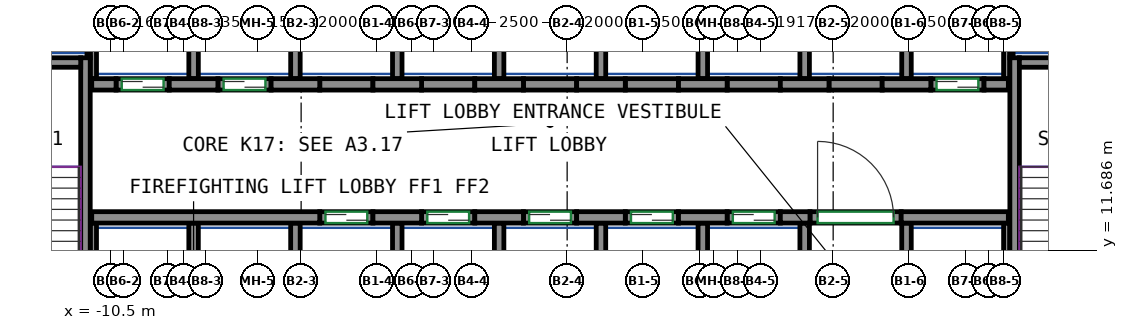
"""IFC4 building model, lengths in metres.
Left out: names, types, materials, properties, quantities, classifications, styles, units other than length and angle.
Written with IfcOpenShell. Run it as: python <this file> out.ifc"""

import sys

from ifc_helpers import new_model, si_unit, direction, frame, frame_2d, origin, place, context, subcontext, project, spatial, rectangle, extrude, source, transform, mapped, element, fill, save


model = new_model("IFC4")
c1 = context("Model", 3, precision=1e-05, world=origin(), true_north=direction((0.0, 1.0)))
c2 = subcontext(c1, "Body", "Model", "MODEL_VIEW")
j1 = project(units=[si_unit("LENGTHUNIT", "METRE"), si_unit("PLANEANGLEUNIT", "RADIAN")], contexts=[c1])
p1 = place(None, origin())
s1 = spatial("IfcSite", under=j1, at=p1, CompositionType="ELEMENT")
p2 = place(p1, origin())
s2 = spatial("IfcBuilding", under=s1, at=p2, CompositionType="ELEMENT")
p3 = place(p2, frame((0.0, 0.0, 71.2)))
s3 = spatial("IfcBuildingStorey", under=s2, at=p3, CompositionType="ELEMENT", Elevation=71.2)
m1 = source(origin(), c2, "Body", "SweptSolid", [
    extrude(rectangle(XDim=7.75, YDim=0.25, at=frame_2d((3.875, 0.0))), origin(), (0.0, 0.0, 1.0), 3.72),
])
p4 = place(p3, frame((-11.175, 9.0, 0.0), z_axis=(0.0, 0.0, 1.0), x_axis=(0.0, 1.0, 0.0)))
e1 = element("IfcWall", 1, at=p4, inside=s3, PredefinedType="SHEAR", context=c2, shape_type="MappedRepresentation", body=[
    mapped(m1, transform((0.0, 0.0, 0.0))),
])
m2 = source(origin(), c2, "Body", "SweptSolid", [
    extrude(rectangle(XDim=3.7, YDim=0.25, at=frame_2d((1.85, 0.0))), origin(), (0.0, 0.0, 1.0), 3.72),
])
p5 = place(p3, frame((-15.0, 16.625, 0.0), z_axis=(0.0, 0.0, 1.0), x_axis=(1.0, 0.0, 0.0)))
e2 = element("IfcWall", 2, at=p5, inside=s3, PredefinedType="SHEAR", context=c2, shape_type="MappedRepresentation", body=[
    mapped(m2, transform((0.0, 0.0, 0.0))),
])
p6 = place(p3, frame((13.275, 9.0, 0.0), z_axis=(0.0, 0.0, 1.0), x_axis=(0.0, 1.0, 0.0)))
e3 = element("IfcWall", 3, at=p6, inside=s3, PredefinedType="SHEAR", context=c2, shape_type="MappedRepresentation", body=[
    mapped(m1, transform((0.0, 0.0, 0.0))),
])
m3 = source(origin(), c2, "Body", "SweptSolid", [
    extrude(rectangle(XDim=3.7, YDim=0.25, at=frame_2d((1.85, 0.0))), origin(), (0.0, 0.0, 1.0), 3.72),
])
p7 = place(p3, frame((13.4, 16.625, 0.0), z_axis=(0.0, 0.0, 1.0), x_axis=(1.0, 0.0, 0.0)))
e4 = element("IfcWall", 4, at=p7, inside=s3, PredefinedType="SHEAR", context=c2, shape_type="MappedRepresentation", body=[
    mapped(m3, transform((0.0, 0.0, 0.0))),
])
m4 = source(origin(), c2, "Body", "SweptSolid", [
    extrude(rectangle(XDim=6.0, YDim=0.3, at=frame_2d((3.0, 0.0))), origin(), (0.0, 0.0, 1.0), 3.72),
])
p8 = place(p3, frame((-11.01, 12.55, 0.0), z_axis=(0.0, 0.0, 1.0), x_axis=(1.0, 0.0, 0.0)))
e5 = element("IfcWall", 5, at=p8, inside=s3, PredefinedType="SHEAR", context=c2, shape_type="MappedRepresentation", body=[
    mapped(m4, transform((0.0, 0.0, 0.0))),
])
m5 = source(origin(), c2, "Body", "SweptSolid", [
    extrude(rectangle(XDim=1.28, YDim=0.3, at=frame_2d((0.64, 0.0))), origin(), (0.0, 0.0, 1.0), 3.72),
])
for number, where, z_axis, x_axis in (
    (6, (-3.61, 12.55, 0.0), (0.0, 0.0, 1.0), (1.0, 0.0, 0.0)),
    (7, (-0.93, 12.55, 0.0), (0.0, 0.0, 1.0), (1.0, 0.0, 0.0)),
    (8, (1.75, 12.55, 0.0), (0.0, 0.0, 1.0), (1.0, 0.0, 0.0)),
    (9, (4.43, 12.55, 0.0), (0.0, 0.0, 1.0), (1.0, 0.0, 0.0)),
):
    element("IfcWall", number, at=place(p3, frame(where, z_axis=z_axis, x_axis=x_axis)), inside=s3, PredefinedType="SHEAR", context=c2, shape_type="MappedRepresentation", body=[
        mapped(m5, transform((0.0, 0.0, 0.0))),
    ])
m6 = source(origin(), c2, "Body", "SweptSolid", [
    extrude(rectangle(XDim=0.78, YDim=0.3, at=frame_2d((0.39, 0.0))), origin(), (0.0, 0.0, 1.0), 3.72),
])
p9 = place(p3, frame((7.11, 12.55, 0.0), z_axis=(0.0, 0.0, 1.0), x_axis=(1.0, 0.0, 0.0)))
e10 = element("IfcWall", 10, at=p9, inside=s3, PredefinedType="SHEAR", context=c2, shape_type="MappedRepresentation", body=[
    mapped(m6, transform((0.0, 0.0, 0.0))),
])
m7 = source(origin(), c2, "Body", "SweptSolid", [
    extrude(rectangle(XDim=2.82, YDim=0.3, at=frame_2d((1.41, 0.0))), origin(), (0.0, 0.0, 1.0), 3.72),
])
p10 = place(p3, frame((10.29, 12.55, 0.0), z_axis=(0.0, 0.0, 1.0), x_axis=(1.0, 0.0, 0.0)))
e11 = element("IfcWall", 11, at=p10, inside=s3, PredefinedType="SHEAR", context=c2, shape_type="MappedRepresentation", body=[
    mapped(m7, transform((0.0, 0.0, 0.0))),
])
m8 = source(origin(), c2, "Body", "SweptSolid", [
    extrude(rectangle(XDim=0.64, YDim=0.3, at=frame_2d((0.32, 0.0))), origin(), (0.0, 0.0, 1.0), 3.72),
])
p11 = place(p3, frame((-11.01, 16.05, 0.0), z_axis=(0.0, 0.0, 1.0), x_axis=(1.0, 0.0, 0.0)))
e12 = element("IfcWall", 12, at=p11, inside=s3, PredefinedType="SHEAR", context=c2, shape_type="MappedRepresentation", body=[
    mapped(m8, transform((0.0, 0.0, 0.0))),
])
for number, where, z_axis, x_axis in (
    (13, (-8.97, 16.05, 0.0), (0.0, 0.0, 1.0), (1.0, 0.0, 0.0)),
    (14, (-6.29, 16.05, 0.0), (0.0, 0.0, 1.0), (1.0, 0.0, 0.0)),
    (15, (-3.61, 16.05, 0.0), (0.0, 0.0, 1.0), (1.0, 0.0, 0.0)),
    (16, (-0.93, 16.05, 0.0), (0.0, 0.0, 1.0), (1.0, 0.0, 0.0)),
    (17, (1.75, 16.05, 0.0), (0.0, 0.0, 1.0), (1.0, 0.0, 0.0)),
    (18, (4.43, 16.05, 0.0), (0.0, 0.0, 1.0), (1.0, 0.0, 0.0)),
):
    element("IfcWall", number, at=place(p3, frame(where, z_axis=z_axis, x_axis=x_axis)), inside=s3, PredefinedType="SHEAR", context=c2, shape_type="MappedRepresentation", body=[
        mapped(m5, transform((0.0, 0.0, 0.0))),
    ])
m9 = source(origin(), c2, "Body", "SweptSolid", [
    extrude(rectangle(XDim=1.28, YDim=0.3, at=frame_2d((0.64, 0.0))), origin(), (0.0, 0.0, 1.0), 3.72),
])
p12 = place(p3, frame((7.11, 16.05, 0.0), z_axis=(0.0, 0.0, 1.0), x_axis=(1.0, 0.0, 0.0)))
e19 = element("IfcWall", 19, at=p12, inside=s3, PredefinedType="SHEAR", context=c2, shape_type="MappedRepresentation", body=[
    mapped(m9, transform((0.0, 0.0, 0.0))),
])
p13 = place(p3, frame((9.79, 16.05, 0.0), z_axis=(0.0, 0.0, 1.0), x_axis=(1.0, 0.0, 0.0)))
e20 = element("IfcWall", 20, at=p13, inside=s3, PredefinedType="SHEAR", context=c2, shape_type="MappedRepresentation", body=[
    mapped(m5, transform((0.0, 0.0, 0.0))),
])
m10 = source(origin(), c2, "Body", "SweptSolid", [
    extrude(rectangle(XDim=0.64, YDim=0.3, at=frame_2d((0.32, 0.0))), origin(), (0.0, 0.0, 1.0), 3.72),
])
p14 = place(p3, frame((12.47, 16.05, 0.0), z_axis=(0.0, 0.0, 1.0), x_axis=(1.0, 0.0, 0.0)))
e21 = element("IfcWall", 21, at=p14, inside=s3, PredefinedType="SHEAR", context=c2, shape_type="MappedRepresentation", body=[
    mapped(m10, transform((0.0, 0.0, 0.0))),
])
m11 = source(origin(), c2, "Body", "SweptSolid", [
    extrude(rectangle(XDim=1.4, YDim=0.3, at=frame_2d((0.7, 0.0))), origin(), (0.0, 0.0, 1.0), 3.72),
])
p15 = place(p3, frame((-5.01, 12.55, 0.0), z_axis=(0.0, 0.0, 1.0), x_axis=(1.0, 0.0, 0.0)))
e22 = element("IfcWall", 22, at=p15, inside=s3, PredefinedType="PARTITIONING", context=c2, shape_type="MappedRepresentation", body=[
    mapped(m11, transform((0.0, 0.0, 0.0))),
])
p16 = place(p15, frame((0.15, 0.0, 0.0)))
e23 = element("IfcOpeningElement", 23, at=p16, cuts=e22, PredefinedType="OPENING", context=c2, shape_type="SweptSolid", body=[
    extrude(rectangle(XDim=1.1, YDim=2.1, at=frame_2d((0.55, 1.05))), frame((0.0, 0.16, 0.0), z_axis=(0.0, -1.0, 0.0), x_axis=(1.0, 0.0, 0.0)), (0.0, 0.0, 1.0), 0.32),
])
m12 = source(origin(), c2, "Body", "SweptSolid", [
    extrude(rectangle(XDim=1.4, YDim=0.3, at=frame_2d((0.7, 0.0))), origin(), (0.0, 0.0, 1.0), 3.72),
])
p17 = place(p3, frame((-2.33, 12.55, 0.0), z_axis=(0.0, 0.0, 1.0), x_axis=(1.0, 0.0, 0.0)))
e24 = element("IfcWall", 24, at=p17, inside=s3, PredefinedType="PARTITIONING", context=c2, shape_type="MappedRepresentation", body=[
    mapped(m12, transform((0.0, 0.0, 0.0))),
])
p18 = place(p17, frame((0.15, 0.0, 0.0)))
e25 = element("IfcOpeningElement", 25, at=p18, cuts=e24, PredefinedType="OPENING", context=c2, shape_type="SweptSolid", body=[
    extrude(rectangle(XDim=1.1, YDim=2.1, at=frame_2d((0.55, 1.05))), frame((0.0, 0.16, 0.0), z_axis=(0.0, -1.0, 0.0), x_axis=(1.0, 0.0, 0.0)), (0.0, 0.0, 1.0), 0.32),
])
p19 = place(p3, frame((0.35, 12.55, 0.0), z_axis=(0.0, 0.0, 1.0), x_axis=(1.0, 0.0, 0.0)))
e26 = element("IfcWall", 26, at=p19, inside=s3, PredefinedType="PARTITIONING", context=c2, shape_type="MappedRepresentation", body=[
    mapped(m11, transform((0.0, 0.0, 0.0))),
])
p20 = place(p19, frame((0.15, 0.0, 0.0)))
e27 = element("IfcOpeningElement", 27, at=p20, cuts=e26, PredefinedType="OPENING", context=c2, shape_type="SweptSolid", body=[
    extrude(rectangle(XDim=1.1, YDim=2.1, at=frame_2d((0.55, 1.05))), frame((0.0, 0.16, 0.0), z_axis=(0.0, -1.0, 0.0), x_axis=(1.0, 0.0, 0.0)), (0.0, 0.0, 1.0), 0.32),
])
p21 = place(p3, frame((3.03, 12.55, 0.0), z_axis=(0.0, 0.0, 1.0), x_axis=(1.0, 0.0, 0.0)))
e28 = element("IfcWall", 28, at=p21, inside=s3, PredefinedType="PARTITIONING", context=c2, shape_type="MappedRepresentation", body=[
    mapped(m11, transform((0.0, 0.0, 0.0))),
])
p22 = place(p21, frame((0.15, 0.0, 0.0)))
e29 = element("IfcOpeningElement", 29, at=p22, cuts=e28, PredefinedType="OPENING", context=c2, shape_type="SweptSolid", body=[
    extrude(rectangle(XDim=1.1, YDim=2.1, at=frame_2d((0.55, 1.05))), frame((0.0, 0.16, 0.0), z_axis=(0.0, -1.0, 0.0), x_axis=(1.0, 0.0, 0.0)), (0.0, 0.0, 1.0), 0.32),
])
p23 = place(p3, frame((5.71, 12.55, 0.0), z_axis=(0.0, 0.0, 1.0), x_axis=(1.0, 0.0, 0.0)))
e30 = element("IfcWall", 30, at=p23, inside=s3, PredefinedType="PARTITIONING", context=c2, shape_type="MappedRepresentation", body=[
    mapped(m12, transform((0.0, 0.0, 0.0))),
])
p24 = place(p23, frame((0.15, 0.0, 0.0)))
e31 = element("IfcOpeningElement", 31, at=p24, cuts=e30, PredefinedType="OPENING", context=c2, shape_type="SweptSolid", body=[
    extrude(rectangle(XDim=1.1, YDim=2.1, at=frame_2d((0.55, 1.05))), frame((0.0, 0.16, 0.0), z_axis=(0.0, -1.0, 0.0), x_axis=(1.0, 0.0, 0.0)), (0.0, 0.0, 1.0), 0.32),
])
p25 = place(p3, frame((11.07, 16.05, 0.0), z_axis=(0.0, 0.0, 1.0), x_axis=(1.0, 0.0, 0.0)))
e32 = element("IfcWall", 32, at=p25, inside=s3, PredefinedType="PARTITIONING", context=c2, shape_type="MappedRepresentation", body=[
    mapped(m11, transform((0.0, 0.0, 0.0))),
])
p26 = place(p25, frame((0.15, 0.0, 0.0)))
e33 = element("IfcOpeningElement", 33, at=p26, cuts=e32, PredefinedType="OPENING", context=c2, shape_type="SweptSolid", body=[
    extrude(rectangle(XDim=1.1, YDim=2.1, at=frame_2d((0.55, 1.05))), frame((0.0, 0.16, 0.0), z_axis=(0.0, -1.0, 0.0), x_axis=(1.0, 0.0, 0.0)), (0.0, 0.0, 1.0), 0.32),
])
p27 = place(p3, frame((-10.37, 16.05, 0.0), z_axis=(0.0, 0.0, 1.0), x_axis=(1.0, 0.0, 0.0)))
e34 = element("IfcWall", 34, at=p27, inside=s3, PredefinedType="PARTITIONING", context=c2, shape_type="MappedRepresentation", body=[
    mapped(m12, transform((0.0, 0.0, 0.0))),
])
p28 = place(p27, frame((0.15, 0.0, 0.0)))
e35 = element("IfcOpeningElement", 35, at=p28, cuts=e34, PredefinedType="OPENING", context=c2, shape_type="SweptSolid", body=[
    extrude(rectangle(XDim=1.1, YDim=2.1, at=frame_2d((0.55, 1.05))), frame((0.0, 0.16, 0.0), z_axis=(0.0, -1.0, 0.0), x_axis=(1.0, 0.0, 0.0)), (0.0, 0.0, 1.0), 0.32),
])
p29 = place(p3, frame((-7.69, 16.05, 0.0), z_axis=(0.0, 0.0, 1.0), x_axis=(1.0, 0.0, 0.0)))
e36 = element("IfcWall", 36, at=p29, inside=s3, PredefinedType="PARTITIONING", context=c2, shape_type="MappedRepresentation", body=[
    mapped(m11, transform((0.0, 0.0, 0.0))),
])
p30 = place(p29, frame((0.15, 0.0, 0.0)))
e37 = element("IfcOpeningElement", 37, at=p30, cuts=e36, PredefinedType="OPENING", context=c2, shape_type="SweptSolid", body=[
    extrude(rectangle(XDim=1.1, YDim=2.1, at=frame_2d((0.55, 1.05))), frame((0.0, 0.16, 0.0), z_axis=(0.0, -1.0, 0.0), x_axis=(1.0, 0.0, 0.0)), (0.0, 0.0, 1.0), 0.32),
])
m13 = source(origin(), c2, "Body", "SweptSolid", [
    extrude(rectangle(XDim=2.4, YDim=0.3, at=frame_2d((1.2, 0.0))), origin(), (0.0, 0.0, 1.0), 3.72),
])
p31 = place(p3, frame((7.89, 12.55, 0.0), z_axis=(0.0, 0.0, 1.0), x_axis=(1.0, 0.0, 0.0)))
e38 = element("IfcWall", 38, at=p31, inside=s3, PredefinedType="PARTITIONING", context=c2, shape_type="MappedRepresentation", body=[
    mapped(m13, transform((0.0, 0.0, 0.0))),
])
p32 = place(p31, frame((0.2, 0.0, 0.0)))
e39 = element("IfcOpeningElement", 39, at=p32, cuts=e38, PredefinedType="OPENING", context=c2, shape_type="SweptSolid", body=[
    extrude(rectangle(XDim=2.0, YDim=2.1, at=frame_2d((1.0, 1.05))), frame((0.0, 0.16, 0.0), z_axis=(0.0, -1.0, 0.0), x_axis=(1.0, 0.0, 0.0)), (0.0, 0.0, 1.0), 0.32),
])
p33 = place(p3, frame((-5.01, 16.05, 0.0), z_axis=(0.0, 0.0, 1.0), x_axis=(1.0, 0.0, 0.0)))
e40 = element("IfcWall", 40, at=p33, inside=s3, PredefinedType="PARTITIONING", context=c2, shape_type="MappedRepresentation", body=[
    mapped(m11, transform((0.0, 0.0, 0.0))),
])
p34 = place(p3, frame((-2.33, 16.05, 0.0), z_axis=(0.0, 0.0, 1.0), x_axis=(1.0, 0.0, 0.0)))
e41 = element("IfcWall", 41, at=p34, inside=s3, PredefinedType="PARTITIONING", context=c2, shape_type="MappedRepresentation", body=[
    mapped(m12, transform((0.0, 0.0, 0.0))),
])
for number, where, z_axis, x_axis in (
    (42, (0.35, 16.05, 0.0), (0.0, 0.0, 1.0), (1.0, 0.0, 0.0)),
    (43, (3.03, 16.05, 0.0), (0.0, 0.0, 1.0), (1.0, 0.0, 0.0)),
):
    element("IfcWall", number, at=place(p3, frame(where, z_axis=z_axis, x_axis=x_axis)), inside=s3, PredefinedType="PARTITIONING", context=c2, shape_type="MappedRepresentation", body=[
        mapped(m11, transform((0.0, 0.0, 0.0))),
    ])
for number, where, z_axis, x_axis in (
    (44, (5.71, 16.05, 0.0), (0.0, 0.0, 1.0), (1.0, 0.0, 0.0)),
    (45, (8.39, 16.05, 0.0), (0.0, 0.0, 1.0), (1.0, 0.0, 0.0)),
):
    element("IfcWall", number, at=place(p3, frame(where, z_axis=z_axis, x_axis=x_axis)), inside=s3, PredefinedType="PARTITIONING", context=c2, shape_type="MappedRepresentation", body=[
        mapped(m12, transform((0.0, 0.0, 0.0))),
    ])
m14 = source(origin(), c2, "Body", "SweptSolid", [
    extrude(rectangle(XDim=3.275, YDim=0.165, at=frame_2d((1.638, 0.0))), origin(), (0.0, 0.0, 1.0), 3.72),
])
for number, where, z_axis, x_axis in (
    (46, (13.067, 16.2, 0.0), (0.0, 0.0, 1.0), (0.0, 1.0, 0.0)),
    (47, (-10.968, 16.2, 0.0), (0.0, 0.0, 1.0), (0.0, 1.0, 0.0)),
):
    element("IfcWall", number, at=place(p3, frame(where, z_axis=z_axis, x_axis=x_axis)), inside=s3, PredefinedType="PARTITIONING", context=c2, shape_type="MappedRepresentation", body=[
        mapped(m14, transform((0.0, 0.0, 0.0))),
    ])
m15 = source(origin(), c2, "Body", "SweptSolid", [
    extrude(rectangle(XDim=3.275, YDim=0.25, at=frame_2d((1.638, 0.0))), origin(), (0.0, 0.0, 1.0), 3.72),
])
p35 = place(p3, frame((10.43, 16.2, 0.0), z_axis=(0.0, 0.0, 1.0), x_axis=(0.0, 1.0, 0.0)))
e48 = element("IfcWall", 48, at=p35, inside=s3, PredefinedType="PARTITIONING", context=c2, shape_type="MappedRepresentation", body=[
    mapped(m15, transform((0.0, 0.0, 0.0))),
])
m16 = source(origin(), c2, "Body", "SweptSolid", [
    extrude(rectangle(XDim=2.725, YDim=0.085, at=frame_2d((1.363, 0.0))), origin(), (0.0, 0.0, 1.0), 3.72),
])
p36 = place(p3, frame((13.192, 16.75, 0.0), z_axis=(0.0, 0.0, 1.0), x_axis=(0.0, 1.0, 0.0)))
e49 = element("IfcWall", 49, at=p36, inside=s3, PredefinedType="PARTITIONING", context=c2, shape_type="MappedRepresentation", body=[
    mapped(m16, transform((0.0, 0.0, 0.0))),
])
for number, where, z_axis, x_axis in (
    (50, (2.39, 16.2, 0.0), (0.0, 0.0, 1.0), (0.0, 1.0, 0.0)),
    (51, (5.07, 16.2, 0.0), (0.0, 0.0, 1.0), (0.0, 1.0, 0.0)),
    (52, (7.75, 16.2, 0.0), (0.0, 0.0, 1.0), (0.0, 1.0, 0.0)),
    (53, (-0.29, 16.2, 0.0), (0.0, 0.0, 1.0), (0.0, 1.0, 0.0)),
):
    element("IfcWall", number, at=place(p3, frame(where, z_axis=z_axis, x_axis=x_axis)), inside=s3, PredefinedType="PARTITIONING", context=c2, shape_type="MappedRepresentation", body=[
        mapped(m15, transform((0.0, 0.0, 0.0))),
    ])
p37 = place(p3, frame((-11.093, 16.75, 0.0), z_axis=(0.0, 0.0, 1.0), x_axis=(0.0, 1.0, 0.0)))
e54 = element("IfcWall", 54, at=p37, inside=s3, PredefinedType="PARTITIONING", context=c2, shape_type="MappedRepresentation", body=[
    mapped(m16, transform((0.0, 0.0, 0.0))),
])
for number, where, z_axis, x_axis in (
    (55, (-2.97, 16.2, 0.0), (0.0, 0.0, 1.0), (0.0, 1.0, 0.0)),
    (56, (-5.65, 16.2, 0.0), (0.0, 0.0, 1.0), (0.0, 1.0, 0.0)),
    (57, (-8.33, 16.2, 0.0), (0.0, 0.0, 1.0), (0.0, 1.0, 0.0)),
):
    element("IfcWall", number, at=place(p3, frame(where, z_axis=z_axis, x_axis=x_axis)), inside=s3, PredefinedType="PARTITIONING", context=c2, shape_type="MappedRepresentation", body=[
        mapped(m15, transform((0.0, 0.0, 0.0))),
    ])
m17 = source(origin(), c2, "Body", "SweptSolid", [
    extrude(rectangle(XDim=3.4, YDim=0.25, at=frame_2d((1.7, 0.0))), origin(), (0.0, 0.0, 1.0), 3.72),
])
p38 = place(p3, frame((10.43, 9.0, 0.0), z_axis=(0.0, 0.0, 1.0), x_axis=(0.0, 1.0, 0.0)))
e58 = element("IfcWall", 58, at=p38, inside=s3, PredefinedType="PARTITIONING", context=c2, shape_type="MappedRepresentation", body=[
    mapped(m17, transform((0.0, 0.0, 0.0))),
])
m18 = source(origin(), c2, "Body", "SweptSolid", [
    extrude(rectangle(XDim=3.4, YDim=0.165, at=frame_2d((1.7, 0.0))), origin(), (0.0, 0.0, 1.0), 3.72),
])
p39 = place(p3, frame((13.067, 9.0, 0.0), z_axis=(0.0, 0.0, 1.0), x_axis=(0.0, 1.0, 0.0)))
e59 = element("IfcWall", 59, at=p39, inside=s3, PredefinedType="PARTITIONING", context=c2, shape_type="MappedRepresentation", body=[
    mapped(m18, transform((0.0, 0.0, 0.0))),
])
for number, where, z_axis, x_axis in (
    (60, (2.39, 9.0, 0.0), (0.0, 0.0, 1.0), (0.0, 1.0, 0.0)),
    (61, (5.07, 9.0, 0.0), (0.0, 0.0, 1.0), (0.0, 1.0, 0.0)),
    (62, (7.75, 9.0, 0.0), (0.0, 0.0, 1.0), (0.0, 1.0, 0.0)),
    (63, (-0.29, 9.0, 0.0), (0.0, 0.0, 1.0), (0.0, 1.0, 0.0)),
):
    element("IfcWall", number, at=place(p3, frame(where, z_axis=z_axis, x_axis=x_axis)), inside=s3, PredefinedType="PARTITIONING", context=c2, shape_type="MappedRepresentation", body=[
        mapped(m17, transform((0.0, 0.0, 0.0))),
    ])
p40 = place(p3, frame((-10.968, 9.0, 0.0), z_axis=(0.0, 0.0, 1.0), x_axis=(0.0, 1.0, 0.0)))
e64 = element("IfcWall", 64, at=p40, inside=s3, PredefinedType="PARTITIONING", context=c2, shape_type="MappedRepresentation", body=[
    mapped(m18, transform((0.0, 0.0, 0.0))),
])
for number, where, z_axis, x_axis in (
    (65, (-2.97, 9.0, 0.0), (0.0, 0.0, 1.0), (0.0, 1.0, 0.0)),
    (66, (-5.65, 9.0, 0.0), (0.0, 0.0, 1.0), (0.0, 1.0, 0.0)),
    (67, (-8.33, 9.0, 0.0), (0.0, 0.0, 1.0), (0.0, 1.0, 0.0)),
):
    element("IfcWall", number, at=place(p3, frame(where, z_axis=z_axis, x_axis=x_axis)), inside=s3, PredefinedType="PARTITIONING", context=c2, shape_type="MappedRepresentation", body=[
        mapped(m17, transform((0.0, 0.0, 0.0))),
    ])
p41 = place(p32, origin())
e68 = element("IfcDoor", 68, at=p41, inside=s3, OperationType="DOUBLE_DOOR_SINGLE_SWING", PredefinedType="DOOR", context=c2, shape_type="SweptSolid", body=[
    extrude(rectangle(XDim=2.0, YDim=2.1, at=frame_2d((1.0, 1.05))), frame((0.0, 0.025, 0.0), z_axis=(0.0, -1.0, 0.0), x_axis=(1.0, 0.0, 0.0)), (0.0, 0.0, 1.0), 0.05),
])
fill(e39, e68)
p42 = place(p16, origin())
e69 = element("IfcDoor", 69, at=p42, inside=s3, OperationType="DOUBLE_DOOR_SLIDING", PredefinedType="DOOR", context=c2, shape_type="SweptSolid", body=[
    extrude(rectangle(XDim=1.1, YDim=2.1, at=frame_2d((0.55, 1.05))), frame((0.0, 0.025, 0.0), z_axis=(0.0, -1.0, 0.0), x_axis=(1.0, 0.0, 0.0)), (0.0, 0.0, 1.0), 0.05),
])
fill(e23, e69)
p43 = place(p18, origin())
e70 = element("IfcDoor", 70, at=p43, inside=s3, OperationType="DOUBLE_DOOR_SLIDING", PredefinedType="DOOR", context=c2, shape_type="SweptSolid", body=[
    extrude(rectangle(XDim=1.1, YDim=2.1, at=frame_2d((0.55, 1.05))), frame((0.0, 0.025, 0.0), z_axis=(0.0, -1.0, 0.0), x_axis=(1.0, 0.0, 0.0)), (0.0, 0.0, 1.0), 0.05),
])
fill(e25, e70)
p44 = place(p20, origin())
e71 = element("IfcDoor", 71, at=p44, inside=s3, OperationType="DOUBLE_DOOR_SLIDING", PredefinedType="DOOR", context=c2, shape_type="SweptSolid", body=[
    extrude(rectangle(XDim=1.1, YDim=2.1, at=frame_2d((0.55, 1.05))), frame((0.0, 0.025, 0.0), z_axis=(0.0, -1.0, 0.0), x_axis=(1.0, 0.0, 0.0)), (0.0, 0.0, 1.0), 0.05),
])
fill(e27, e71)
p45 = place(p22, origin())
e72 = element("IfcDoor", 72, at=p45, inside=s3, OperationType="DOUBLE_DOOR_SLIDING", PredefinedType="DOOR", context=c2, shape_type="SweptSolid", body=[
    extrude(rectangle(XDim=1.1, YDim=2.1, at=frame_2d((0.55, 1.05))), frame((0.0, 0.025, 0.0), z_axis=(0.0, -1.0, 0.0), x_axis=(1.0, 0.0, 0.0)), (0.0, 0.0, 1.0), 0.05),
])
fill(e29, e72)
p46 = place(p24, origin())
e73 = element("IfcDoor", 73, at=p46, inside=s3, OperationType="DOUBLE_DOOR_SLIDING", PredefinedType="DOOR", context=c2, shape_type="SweptSolid", body=[
    extrude(rectangle(XDim=1.1, YDim=2.1, at=frame_2d((0.55, 1.05))), frame((0.0, 0.025, 0.0), z_axis=(0.0, -1.0, 0.0), x_axis=(1.0, 0.0, 0.0)), (0.0, 0.0, 1.0), 0.05),
])
fill(e31, e73)
p47 = place(p26, origin())
e74 = element("IfcDoor", 74, at=p47, inside=s3, OperationType="DOUBLE_DOOR_SLIDING", PredefinedType="DOOR", context=c2, shape_type="SweptSolid", body=[
    extrude(rectangle(XDim=1.1, YDim=2.1, at=frame_2d((0.55, 1.05))), frame((0.0, 0.025, 0.0), z_axis=(0.0, -1.0, 0.0), x_axis=(1.0, 0.0, 0.0)), (0.0, 0.0, 1.0), 0.05),
])
fill(e33, e74)
p48 = place(p28, origin())
e75 = element("IfcDoor", 75, at=p48, inside=s3, OperationType="DOUBLE_DOOR_SLIDING", PredefinedType="DOOR", context=c2, shape_type="SweptSolid", body=[
    extrude(rectangle(XDim=1.1, YDim=2.1, at=frame_2d((0.55, 1.05))), frame((0.0, 0.025, 0.0), z_axis=(0.0, -1.0, 0.0), x_axis=(1.0, 0.0, 0.0)), (0.0, 0.0, 1.0), 0.05),
])
fill(e35, e75)
p49 = place(p30, origin())
e76 = element("IfcDoor", 76, at=p49, inside=s3, OperationType="DOUBLE_DOOR_SLIDING", PredefinedType="DOOR", context=c2, shape_type="SweptSolid", body=[
    extrude(rectangle(XDim=1.1, YDim=2.1, at=frame_2d((0.55, 1.05))), frame((0.0, 0.025, 0.0), z_axis=(0.0, -1.0, 0.0), x_axis=(1.0, 0.0, 0.0)), (0.0, 0.0, 1.0), 0.05),
])
fill(e37, e76)
save(model, sys.argv[1])
